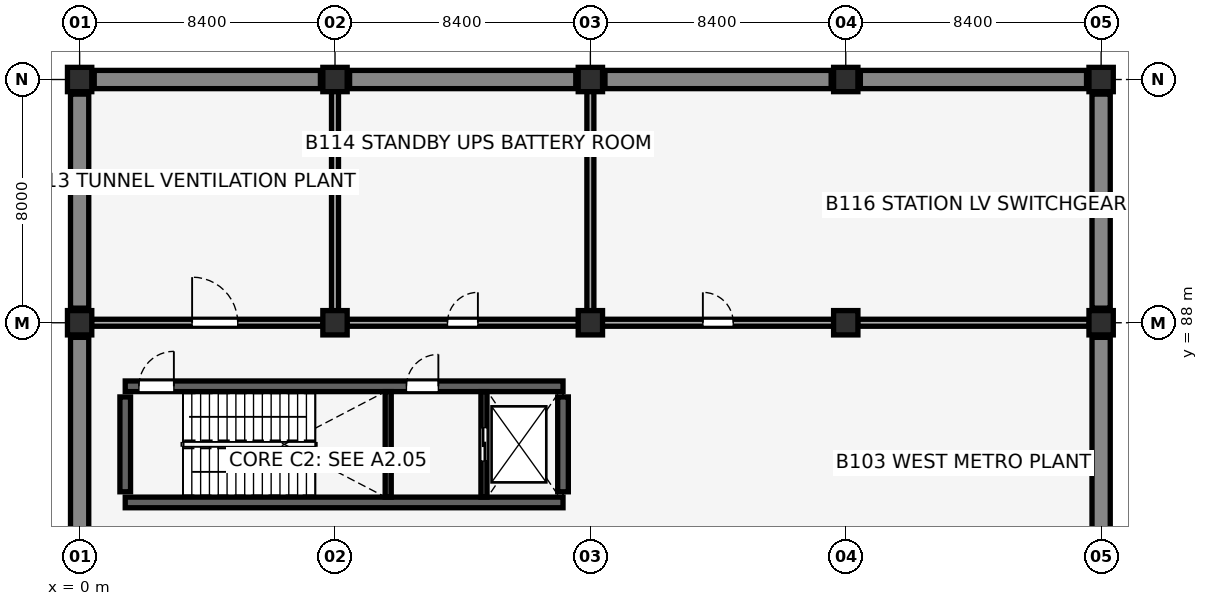
"""IFC4 building model, lengths in metres.
Left out: names, types, materials, properties, quantities, classifications, styles, units other than length and angle.
Written with IfcOpenShell. Run it as: python <this file> out.ifc"""

import sys

from ifc_helpers import new_model, si_unit, direction, frame, frame_2d, origin, origin_2d, place, context, subcontext, project, spatial, rectangle, extrude, element, fill, save


model = new_model("IFC4")
c1 = context("Model", 3, precision=1e-05, world=origin(), true_north=direction((0.0, 1.0)))
c2 = subcontext(c1, "Body", "Model", "MODEL_VIEW")
j1 = project(units=[si_unit("LENGTHUNIT", "METRE"), si_unit("PLANEANGLEUNIT", "RADIAN")], contexts=[c1])
p1 = place(None, origin())
s1 = spatial("IfcSite", under=j1, at=p1, CompositionType="ELEMENT")
p2 = place(p1, origin())
s2 = spatial("IfcBuilding", under=s1, at=p2, CompositionType="ELEMENT")
p3 = place(p2, frame((0.0, 0.0, -5.44)))
s3 = spatial("IfcBuildingStorey", under=s2, at=p3, CompositionType="ELEMENT", Elevation=-5.44)
for number, where, z_axis, x_axis in (
    (1, (0.0, 80.48, 0.0), (0.0, 0.0, 1.0), (0.0, 1.0, 0.0)),
    (2, (0.0, 88.48, 0.0), (0.0, 0.0, 1.0), (0.0, 1.0, 0.0)),
):
    element("IfcWall", number, at=place(p3, frame(where, z_axis=z_axis, x_axis=x_axis)), inside=s3, PredefinedType="SOLIDWALL", context=c2, shape_type="SweptSolid", body=[
        extrude(rectangle(XDim=7.04, YDim=0.6, at=frame_2d((3.52, 0.0))), origin(), (0.0, 0.0, 1.0), 5.02),
    ])
p4 = place(p3, frame((0.48, 96.0, 0.0), z_axis=(0.0, 0.0, 1.0), x_axis=(1.0, 0.0, 0.0)))
e3 = element("IfcWall", 3, at=p4, inside=s3, PredefinedType="SOLIDWALL", context=c2, shape_type="SweptSolid", body=[
    extrude(rectangle(XDim=7.44, YDim=0.6, at=frame_2d((3.72, 0.0))), origin(), (0.0, 0.0, 1.0), 5.02),
])
p5 = place(p3, frame((8.88, 96.0, 0.0), z_axis=(0.0, 0.0, 1.0), x_axis=(1.0, 0.0, 0.0)))
e4 = element("IfcWall", 4, at=p5, inside=s3, PredefinedType="SOLIDWALL", context=c2, shape_type="SweptSolid", body=[
    extrude(rectangle(XDim=7.44, YDim=0.6, at=frame_2d((3.72, 0.0))), origin(), (0.0, 0.0, 1.0), 5.02),
])
p6 = place(p3, frame((17.28, 96.0, 0.0), z_axis=(0.0, 0.0, 1.0), x_axis=(1.0, 0.0, 0.0)))
e5 = element("IfcWall", 5, at=p6, inside=s3, PredefinedType="SOLIDWALL", context=c2, shape_type="SweptSolid", body=[
    extrude(rectangle(XDim=7.44, YDim=0.6, at=frame_2d((3.72, 0.0))), origin(), (0.0, 0.0, 1.0), 5.02),
])
p7 = place(p3, frame((25.68, 96.0, 0.0), z_axis=(0.0, 0.0, 1.0), x_axis=(1.0, 0.0, 0.0)))
e6 = element("IfcWall", 6, at=p7, inside=s3, PredefinedType="SOLIDWALL", context=c2, shape_type="SweptSolid", body=[
    extrude(rectangle(XDim=7.44, YDim=0.6, at=frame_2d((3.72, 0.0))), origin(), (0.0, 0.0, 1.0), 5.02),
])
for number, where, z_axis, x_axis in (
    (7, (33.6, 80.48, 0.0), (0.0, 0.0, 1.0), (0.0, 1.0, 0.0)),
    (8, (33.6, 88.48, 0.0), (0.0, 0.0, 1.0), (0.0, 1.0, 0.0)),
):
    element("IfcWall", number, at=place(p3, frame(where, z_axis=z_axis, x_axis=x_axis)), inside=s3, PredefinedType="SOLIDWALL", context=c2, shape_type="SweptSolid", body=[
        extrude(rectangle(XDim=7.04, YDim=0.6, at=frame_2d((3.52, 0.0))), origin(), (0.0, 0.0, 1.0), 5.02),
    ])
p8 = place(p3, frame((1.5, 82.09, 0.0), z_axis=(0.0, 0.0, 1.0), x_axis=(1.0, 0.0, 0.0)))
e9 = element("IfcWall", 9, at=p8, inside=s3, PredefinedType="SHEAR", context=c2, shape_type="SweptSolid", body=[
    extrude(rectangle(XDim=14.4, YDim=0.35, at=frame_2d((7.2, 0.0))), origin(), (0.0, 0.0, 1.0), 5.02),
])
p9 = place(p3, frame((1.5, 85.91, 0.0), z_axis=(0.0, 0.0, 1.0), x_axis=(1.0, 0.0, 0.0)))
e10 = element("IfcWall", 10, at=p9, inside=s3, PredefinedType="SHEAR", context=c2, shape_type="SweptSolid", body=[
    extrude(rectangle(XDim=14.4, YDim=0.35, at=frame_2d((7.2, 0.0))), origin(), (0.0, 0.0, 1.0), 5.02),
])
p10 = place(p9, frame((0.45, 0.0, 0.0), z_axis=(0.0, 0.0, 1.0), x_axis=(1.0, 0.0, 0.0)))
e11 = element("IfcOpeningElement", 11, at=p10, cuts=e10, PredefinedType="OPENING", context=c2, shape_type="SweptSolid", body=[
    extrude(rectangle(XDim=1.15, YDim=2.15, at=frame_2d((0.575, 1.075))), frame((0.0, 0.185, 0.0), z_axis=(0.0, -1.0, 0.0), x_axis=(1.0, 0.0, 0.0)), (0.0, 0.0, 1.0), 0.37),
])
p11 = place(p9, frame((9.25, 0.0, 0.0), z_axis=(0.0, 0.0, 1.0), x_axis=(1.0, 0.0, 0.0)))
e12 = element("IfcOpeningElement", 12, at=p11, cuts=e10, PredefinedType="OPENING", context=c2, shape_type="SweptSolid", body=[
    extrude(rectangle(XDim=1.05, YDim=2.15, at=frame_2d((0.525, 1.075))), frame((0.0, 0.185, 0.0), z_axis=(0.0, -1.0, 0.0), x_axis=(1.0, 0.0, 0.0)), (0.0, 0.0, 1.0), 0.37),
])
for number, where, z_axis, x_axis in (
    (13, (1.5, 82.44, 0.0), (0.0, 0.0, 1.0), (0.0, 1.0, 0.0)),
    (14, (15.9, 82.44, 0.0), (0.0, 0.0, 1.0), (0.0, 1.0, 0.0)),
):
    element("IfcWall", number, at=place(p3, frame(where, z_axis=z_axis, x_axis=x_axis)), inside=s3, PredefinedType="SHEAR", context=c2, shape_type="SweptSolid", body=[
        extrude(rectangle(XDim=3.12, YDim=0.35, at=frame_2d((1.56, 0.0))), origin(), (0.0, 0.0, 1.0), 5.02),
    ])
for number, where, z_axis, x_axis in (
    (15, (0.0, 88.0, 0.0), (0.0, 0.0, 1.0), (1.0, 0.0, 0.0)),
    (16, (0.0, 96.0, 0.0), (0.0, 0.0, 1.0), (1.0, 0.0, 0.0)),
    (17, (8.4, 88.0, 0.0), (0.0, 0.0, 1.0), (1.0, 0.0, 0.0)),
    (18, (8.4, 96.0, 0.0), (0.0, 0.0, 1.0), (1.0, 0.0, 0.0)),
    (19, (16.8, 88.0, 0.0), (0.0, 0.0, 1.0), (1.0, 0.0, 0.0)),
    (20, (16.8, 96.0, 0.0), (0.0, 0.0, 1.0), (1.0, 0.0, 0.0)),
    (21, (25.2, 88.0, 0.0), (0.0, 0.0, 1.0), (1.0, 0.0, 0.0)),
    (22, (25.2, 96.0, 0.0), (0.0, 0.0, 1.0), (1.0, 0.0, 0.0)),
    (23, (33.6, 88.0, 0.0), (0.0, 0.0, 1.0), (1.0, 0.0, 0.0)),
    (24, (33.6, 96.0, 0.0), (0.0, 0.0, 1.0), (1.0, 0.0, 0.0)),
):
    element("IfcColumn", number, at=place(p3, frame(where, z_axis=z_axis, x_axis=x_axis)), inside=s3, PredefinedType="COLUMN", context=c2, shape_type="SweptSolid", body=[
        extrude(rectangle(XDim=0.8, YDim=0.8, at=origin_2d()), origin(), (0.0, 0.0, 1.0), 5.02),
    ])
p12 = place(p3, frame((10.15, 82.265, 0.0), z_axis=(0.0, 0.0, 1.0), x_axis=(0.0, 1.0, 0.0)))
e25 = element("IfcWall", 25, at=p12, inside=s3, PredefinedType="SHEAR", context=c2, shape_type="SweptSolid", body=[
    extrude(rectangle(XDim=3.47, YDim=0.2, at=frame_2d((1.735, 0.0))), origin(), (0.0, 0.0, 1.0), 5.02),
])
p13 = place(p3, frame((13.3, 82.265, 0.0), z_axis=(0.0, 0.0, 1.0), x_axis=(0.0, 1.0, 0.0)))
e26 = element("IfcWall", 26, at=p13, inside=s3, PredefinedType="SHEAR", context=c2, shape_type="SweptSolid", body=[
    extrude(rectangle(XDim=3.47, YDim=0.2, at=frame_2d((1.735, 0.0))), origin(), (0.0, 0.0, 1.0), 5.02),
])
p14 = place(p13, frame((1.185, 0.0, 0.0), z_axis=(0.0, 0.0, 1.0), x_axis=(1.0, 0.0, 0.0)))
e27 = element("IfcOpeningElement", 27, at=p14, cuts=e26, PredefinedType="OPENING", context=c2, shape_type="SweptSolid", body=[
    extrude(rectangle(XDim=1.1, YDim=2.15, at=frame_2d((0.55, 1.075))), frame((0.0, 0.11, 0.0), z_axis=(0.0, -1.0, 0.0), x_axis=(1.0, 0.0, 0.0)), (0.0, 0.0, 1.0), 0.22),
])
p15 = place(p3, frame((0.39, 88.0, 0.0), z_axis=(0.0, 0.0, 1.0), x_axis=(1.0, 0.0, 0.0)))
e28 = element("IfcWall", 28, at=p15, inside=s3, PredefinedType="PARTITIONING", context=c2, shape_type="SweptSolid", body=[
    extrude(rectangle(XDim=7.62, YDim=0.23, at=frame_2d((3.81, 0.0))), origin(), (0.0, 0.0, 1.0), 4.17),
])
p16 = place(p15, frame((3.31, 0.0, 0.0), z_axis=(0.0, 0.0, 1.0), x_axis=(1.0, 0.0, 0.0)))
e29 = element("IfcOpeningElement", 29, at=p16, cuts=e28, PredefinedType="OPENING", context=c2, shape_type="SweptSolid", body=[
    extrude(rectangle(XDim=1.5, YDim=2.2, at=frame_2d((0.75, 1.1))), frame((0.0, 0.125, 0.0), z_axis=(0.0, -1.0, 0.0), x_axis=(1.0, 0.0, 0.0)), (0.0, 0.0, 1.0), 0.25),
])
p17 = place(p3, frame((8.79, 88.0, 0.0), z_axis=(0.0, 0.0, 1.0), x_axis=(1.0, 0.0, 0.0)))
e30 = element("IfcWall", 30, at=p17, inside=s3, PredefinedType="PARTITIONING", context=c2, shape_type="SweptSolid", body=[
    extrude(rectangle(XDim=7.62, YDim=0.23, at=frame_2d((3.81, 0.0))), origin(), (0.0, 0.0, 1.0), 4.17),
])
p18 = place(p17, frame((3.31, 0.0, 0.0), z_axis=(0.0, 0.0, 1.0), x_axis=(1.0, 0.0, 0.0)))
e31 = element("IfcOpeningElement", 31, at=p18, cuts=e30, PredefinedType="OPENING", context=c2, shape_type="SweptSolid", body=[
    extrude(rectangle(XDim=1.0, YDim=2.15, at=frame_2d((0.5, 1.075))), frame((0.0, 0.125, 0.0), z_axis=(0.0, -1.0, 0.0), x_axis=(1.0, 0.0, 0.0)), (0.0, 0.0, 1.0), 0.25),
])
p19 = place(p3, frame((17.19, 88.0, 0.0), z_axis=(0.0, 0.0, 1.0), x_axis=(1.0, 0.0, 0.0)))
e32 = element("IfcWall", 32, at=p19, inside=s3, PredefinedType="PARTITIONING", context=c2, shape_type="SweptSolid", body=[
    extrude(rectangle(XDim=7.62, YDim=0.23, at=frame_2d((3.81, 0.0))), origin(), (0.0, 0.0, 1.0), 4.17),
])
p20 = place(p19, frame((3.31, 0.0, 0.0), z_axis=(0.0, 0.0, 1.0), x_axis=(1.0, 0.0, 0.0)))
e33 = element("IfcOpeningElement", 33, at=p20, cuts=e32, PredefinedType="OPENING", context=c2, shape_type="SweptSolid", body=[
    extrude(rectangle(XDim=1.0, YDim=2.15, at=frame_2d((0.5, 1.075))), frame((0.0, 0.125, 0.0), z_axis=(0.0, -1.0, 0.0), x_axis=(1.0, 0.0, 0.0)), (0.0, 0.0, 1.0), 0.25),
])
for number, where, z_axis, x_axis in (
    (34, (8.4, 88.39, 0.0), (0.0, 0.0, 1.0), (0.0, 1.0, 0.0)),
    (35, (16.8, 88.39, 0.0), (0.0, 0.0, 1.0), (0.0, 1.0, 0.0)),
):
    element("IfcWall", number, at=place(p3, frame(where, z_axis=z_axis, x_axis=x_axis)), inside=s3, PredefinedType="PARTITIONING", context=c2, shape_type="SweptSolid", body=[
        extrude(rectangle(XDim=7.22, YDim=0.23, at=frame_2d((3.61, 0.0))), origin(), (0.0, 0.0, 1.0), 4.37),
    ])
p21 = place(p3, frame((25.59, 88.0, 0.0), z_axis=(0.0, 0.0, 1.0), x_axis=(1.0, 0.0, 0.0)))
e36 = element("IfcWall", 36, at=p21, inside=s3, PredefinedType="PARTITIONING", context=c2, shape_type="SweptSolid", body=[
    extrude(rectangle(XDim=7.62, YDim=0.23, at=frame_2d((3.81, 0.0))), origin(), (0.0, 0.0, 1.0), 4.17),
])
p22 = place(p10, origin())
e37 = element("IfcDoor", 37, at=p22, inside=s3, OperationType="SINGLE_SWING_RIGHT", PredefinedType="DOOR", context=c2, shape_type="SweptSolid", body=[
    extrude(rectangle(XDim=1.15, YDim=2.15, at=frame_2d((0.575, 1.075))), frame((0.0, 0.025, 0.0), z_axis=(0.0, -1.0, 0.0), x_axis=(1.0, 0.0, 0.0)), (0.0, 0.0, 1.0), 0.05),
])
fill(e11, e37)
p23 = place(p11, origin())
e38 = element("IfcDoor", 38, at=p23, inside=s3, OperationType="SINGLE_SWING_RIGHT", PredefinedType="DOOR", context=c2, shape_type="SweptSolid", body=[
    extrude(rectangle(XDim=1.05, YDim=2.15, at=frame_2d((0.525, 1.075))), frame((0.0, 0.025, 0.0), z_axis=(0.0, -1.0, 0.0), x_axis=(1.0, 0.0, 0.0)), (0.0, 0.0, 1.0), 0.05),
])
fill(e12, e38)
p24 = place(p14, origin())
e39 = element("IfcDoor", 39, at=p24, inside=s3, OperationType="DOUBLE_DOOR_SLIDING", PredefinedType="DOOR", context=c2, shape_type="SweptSolid", body=[
    extrude(rectangle(XDim=1.1, YDim=2.15, at=frame_2d((0.55, 1.075))), frame((0.0, 0.025, 0.0), z_axis=(0.0, -1.0, 0.0), x_axis=(1.0, 0.0, 0.0)), (0.0, 0.0, 1.0), 0.05),
])
fill(e27, e39)
p25 = place(p16, origin())
e40 = element("IfcDoor", 40, at=p25, inside=s3, OperationType="SINGLE_SWING_LEFT", PredefinedType="DOOR", context=c2, shape_type="SweptSolid", body=[
    extrude(rectangle(XDim=1.5, YDim=2.2, at=frame_2d((0.75, 1.1))), frame((0.0, 0.025, 0.0), z_axis=(0.0, -1.0, 0.0), x_axis=(1.0, 0.0, 0.0)), (0.0, 0.0, 1.0), 0.05),
])
fill(e29, e40)
p26 = place(p18, origin())
e41 = element("IfcDoor", 41, at=p26, inside=s3, OperationType="SINGLE_SWING_RIGHT", PredefinedType="DOOR", context=c2, shape_type="SweptSolid", body=[
    extrude(rectangle(XDim=1.0, YDim=2.15, at=frame_2d((0.5, 1.075))), frame((0.0, 0.025, 0.0), z_axis=(0.0, -1.0, 0.0), x_axis=(1.0, 0.0, 0.0)), (0.0, 0.0, 1.0), 0.05),
])
fill(e31, e41)
p27 = place(p20, origin())
e42 = element("IfcDoor", 42, at=p27, inside=s3, OperationType="SINGLE_SWING_LEFT", PredefinedType="DOOR", context=c2, shape_type="SweptSolid", body=[
    extrude(rectangle(XDim=1.0, YDim=2.15, at=frame_2d((0.5, 1.075))), frame((0.0, 0.025, 0.0), z_axis=(0.0, -1.0, 0.0), x_axis=(1.0, 0.0, 0.0)), (0.0, 0.0, 1.0), 0.05),
])
fill(e33, e42)
save(model, sys.argv[1])
